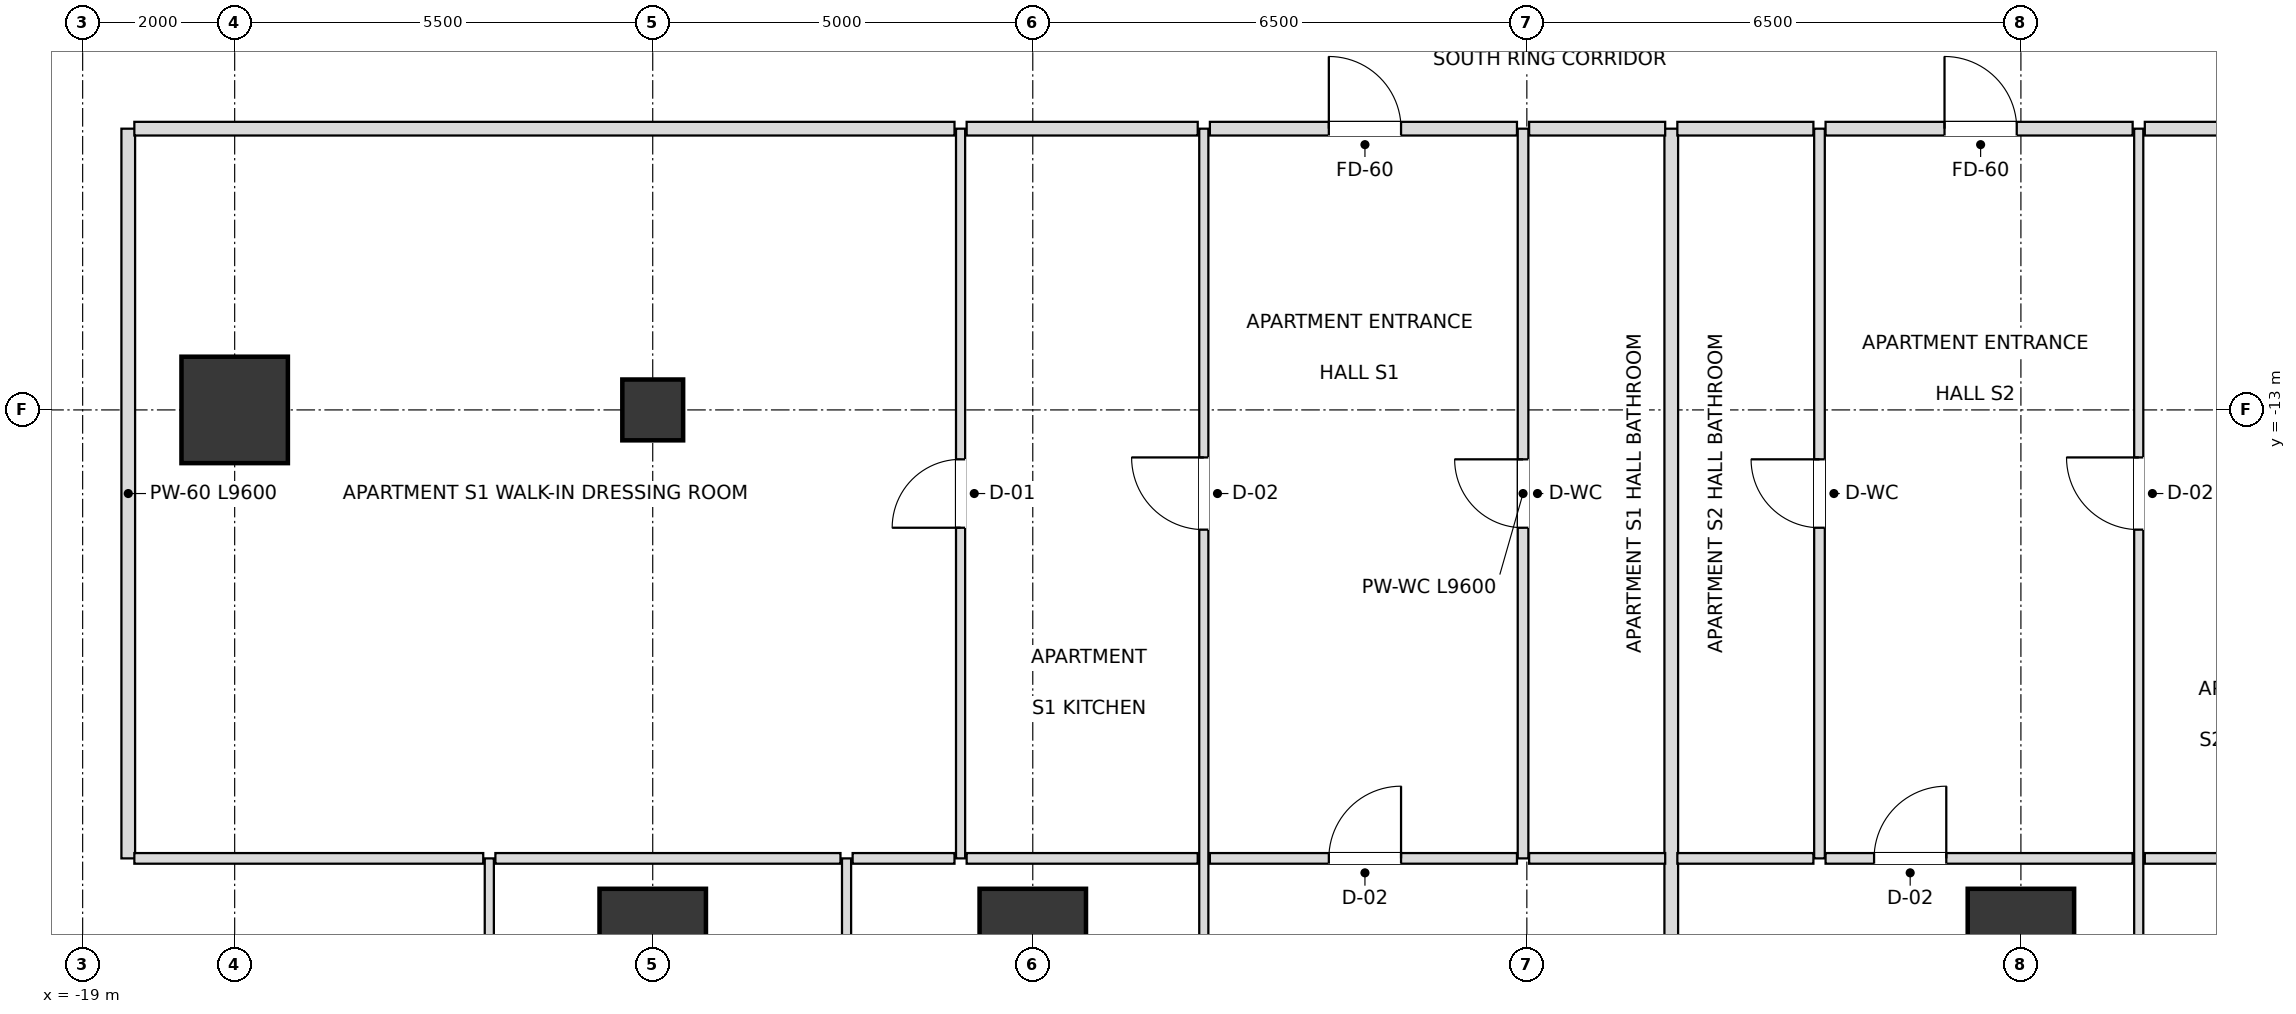
"""IFC4 building model, lengths in metres.
Left out: names, types, materials, properties, quantities, classifications, styles, units other than length and angle.
Written with IfcOpenShell. Run it as: python <this file> out.ifc"""

import sys

from ifc_helpers import new_model, si_unit, direction, frame, frame_2d, origin, origin_2d, place, context, subcontext, project, spatial, rectangle, extrude, element, fill, save


model = new_model("IFC4")
c1 = context("Model", 3, precision=1e-05, world=origin(), true_north=direction((0.0, 1.0)))
c2 = subcontext(c1, "Body", "Model", "MODEL_VIEW")
j1 = project(units=[si_unit("LENGTHUNIT", "METRE"), si_unit("PLANEANGLEUNIT", "RADIAN")], contexts=[c1])
p1 = place(None, origin())
s1 = spatial("IfcSite", under=j1, at=p1, CompositionType="ELEMENT")
p2 = place(p1, origin())
s2 = spatial("IfcBuilding", under=s1, at=p2, CompositionType="ELEMENT")
p3 = place(p2, frame((0.0, 0.0, 50.4)))
s3 = spatial("IfcBuildingStorey", under=s2, at=p3, CompositionType="ELEMENT", Elevation=50.4)
for number, where, z_axis, x_axis in (
    (1, (-11.5, -20.0, 0.0), (0.0, 0.0, 1.0), (1.0, 0.0, 0.0)),
    (2, (-6.5, -20.0, 0.0), (0.0, 0.0, 1.0), (1.0, 0.0, 0.0)),
    (3, (6.5, -20.0, 0.0), (0.0, 0.0, 1.0), (1.0, 0.0, 0.0)),
    (4, (-17.0, -13.0, 0.0), (0.0, 0.0, 1.0), (1.0, 0.0, 0.0)),
):
    element("IfcColumn", number, at=place(p3, frame(where, z_axis=z_axis, x_axis=x_axis)), inside=s3, PredefinedType="USERDEFINED", context=c2, shape_type="SweptSolid", body=[
        extrude(rectangle(XDim=1.4, YDim=1.4, at=origin_2d()), origin(), (0.0, 0.0, 1.0), 3.6),
    ])
p4 = place(p3, frame((-11.5, -13.0, 0.0), z_axis=(0.0, 0.0, 1.0), x_axis=(1.0, 0.0, 0.0)))
e5 = element("IfcColumn", 5, at=p4, inside=s3, PredefinedType="COLUMN", context=c2, shape_type="SweptSolid", body=[
    extrude(rectangle(XDim=0.8, YDim=0.8, at=origin_2d()), origin(), (0.0, 0.0, 1.0), 3.6),
])
p5 = place(p3, frame((-18.4, -18.9, 0.0), z_axis=(0.0, 0.0, 1.0), x_axis=(0.0, 1.0, 0.0)))
e6 = element("IfcWall", 6, at=p5, inside=s3, PredefinedType="PARTITIONING", context=c2, shape_type="SweptSolid", body=[
    extrude(rectangle(XDim=9.6, YDim=0.18, at=frame_2d((4.8, 0.0))), origin(), (0.0, 0.0, 1.0), 2.736),
])
p6 = place(p3, frame((-13.65, -24.9, 0.0), z_axis=(0.0, 0.0, 1.0), x_axis=(0.0, 1.0, 0.0)))
e7 = element("IfcWall", 7, at=p6, inside=s3, PredefinedType="PARTITIONING", context=c2, shape_type="SweptSolid", body=[
    extrude(rectangle(XDim=6.0, YDim=0.12, at=frame_2d((3.0, 0.0))), origin(), (0.0, 0.0, 1.0), 2.736),
])
p7 = place(p6, frame((2.55, 0.0, 0.0)))
e8 = element("IfcOpeningElement", 8, at=p7, cuts=e7, PredefinedType="OPENING", context=c2, shape_type="SweptSolid", body=[
    extrude(rectangle(XDim=0.9, YDim=2.1, at=frame_2d((0.45, 1.05))), frame((0.0, 0.07, 0.0), z_axis=(0.0, -1.0, 0.0), x_axis=(1.0, 0.0, 0.0)), (0.0, 0.0, 1.0), 0.14),
])
p8 = place(p3, frame((-8.95, -24.9, 0.0), z_axis=(0.0, 0.0, 1.0), x_axis=(0.0, 1.0, 0.0)))
e9 = element("IfcWall", 9, at=p8, inside=s3, PredefinedType="PARTITIONING", context=c2, shape_type="SweptSolid", body=[
    extrude(rectangle(XDim=6.0, YDim=0.12, at=frame_2d((3.0, 0.0))), origin(), (0.0, 0.0, 1.0), 2.816),
])
p9 = place(p8, frame((2.55, 0.0, 0.0)))
e10 = element("IfcOpeningElement", 10, at=p9, cuts=e9, PredefinedType="OPENING", context=c2, shape_type="SweptSolid", body=[
    extrude(rectangle(XDim=0.9, YDim=2.1, at=frame_2d((0.45, 1.05))), frame((0.0, 0.07, 0.0), z_axis=(0.0, -1.0, 0.0), x_axis=(1.0, 0.0, 0.0)), (0.0, 0.0, 1.0), 0.14),
])
p10 = place(p3, frame((-7.45, -18.9, 0.0), z_axis=(0.0, 0.0, 1.0), x_axis=(0.0, 1.0, 0.0)))
e11 = element("IfcWall", 11, at=p10, inside=s3, PredefinedType="PARTITIONING", context=c2, shape_type="SweptSolid", body=[
    extrude(rectangle(XDim=9.6, YDim=0.12, at=frame_2d((4.8, 0.0))), origin(), (0.0, 0.0, 1.0), 2.816),
])
p11 = place(p10, frame((4.35, 0.0, 0.0)))
e12 = element("IfcOpeningElement", 12, at=p11, cuts=e11, PredefinedType="OPENING", context=c2, shape_type="SweptSolid", body=[
    extrude(rectangle(XDim=0.9, YDim=2.1, at=frame_2d((0.45, 1.05))), frame((0.0, 0.07, 0.0), z_axis=(0.0, -1.0, 0.0), x_axis=(1.0, 0.0, 0.0)), (0.0, 0.0, 1.0), 0.14),
])
p12 = place(p3, frame((-4.25, -24.9, 0.0), z_axis=(0.0, 0.0, 1.0), x_axis=(0.0, 1.0, 0.0)))
e13 = element("IfcWall", 13, at=p12, inside=s3, PredefinedType="PARTITIONING", context=c2, shape_type="SweptSolid", body=[
    extrude(rectangle(XDim=15.6, YDim=0.12, at=frame_2d((7.8, 0.0))), origin(), (0.0, 0.0, 1.0), 2.816),
])
p13 = place(p12, frame((10.325, 0.0, 0.0)))
e14 = element("IfcOpeningElement", 14, at=p13, cuts=e13, PredefinedType="OPENING", context=c2, shape_type="SweptSolid", body=[
    extrude(rectangle(XDim=0.95, YDim=2.1, at=frame_2d((0.475, 1.05))), frame((0.0, 0.07, 0.0), z_axis=(0.0, -1.0, 0.0), x_axis=(1.0, 0.0, 0.0)), (0.0, 0.0, 1.0), 0.14),
])
p14 = place(p12, frame((2.55, 0.0, 0.0)))
e15 = element("IfcOpeningElement", 15, at=p14, cuts=e13, PredefinedType="OPENING", context=c2, shape_type="SweptSolid", body=[
    extrude(rectangle(XDim=0.9, YDim=2.1, at=frame_2d((0.45, 1.05))), frame((0.0, 0.07, 0.0), z_axis=(0.0, -1.0, 0.0), x_axis=(1.0, 0.0, 0.0)), (0.0, 0.0, 1.0), 0.14),
])
p15 = place(p3, frame((-0.05, -18.9, 0.0), z_axis=(0.0, 0.0, 1.0), x_axis=(0.0, 1.0, 0.0)))
e16 = element("IfcWall", 16, at=p15, inside=s3, PredefinedType="PARTITIONING", context=c2, shape_type="SweptSolid", body=[
    extrude(rectangle(XDim=9.6, YDim=0.14, at=frame_2d((4.8, 0.0))), origin(), (0.0, 0.0, 1.0), 2.948),
])
p16 = place(p15, frame((4.35, 0.0, 0.0)))
e17 = element("IfcOpeningElement", 17, at=p16, cuts=e16, PredefinedType="OPENING", context=c2, shape_type="SweptSolid", body=[
    extrude(rectangle(XDim=0.9, YDim=2.1, at=frame_2d((0.45, 1.05))), frame((0.0, 0.08, 0.0), z_axis=(0.0, -1.0, 0.0), x_axis=(1.0, 0.0, 0.0)), (0.0, 0.0, 1.0), 0.16),
])
p17 = place(p3, frame((1.9, -24.9, 0.0), z_axis=(0.0, 0.0, 1.0), x_axis=(0.0, 1.0, 0.0)))
e18 = element("IfcWall", 18, at=p17, inside=s3, PredefinedType="PARTITIONING", context=c2, shape_type="SweptSolid", body=[
    extrude(rectangle(XDim=15.6, YDim=0.18, at=frame_2d((7.8, 0.0))), origin(), (0.0, 0.0, 1.0), 2.816),
])
p18 = place(p3, frame((3.85, -18.9, 0.0), z_axis=(0.0, 0.0, 1.0), x_axis=(0.0, 1.0, 0.0)))
e19 = element("IfcWall", 19, at=p18, inside=s3, PredefinedType="PARTITIONING", context=c2, shape_type="SweptSolid", body=[
    extrude(rectangle(XDim=9.6, YDim=0.14, at=frame_2d((4.8, 0.0))), origin(), (0.0, 0.0, 1.0), 2.948),
])
p19 = place(p18, frame((4.35, 0.0, 0.0)))
e20 = element("IfcOpeningElement", 20, at=p19, cuts=e19, PredefinedType="OPENING", context=c2, shape_type="SweptSolid", body=[
    extrude(rectangle(XDim=0.9, YDim=2.1, at=frame_2d((0.45, 1.05))), frame((0.0, 0.08, 0.0), z_axis=(0.0, -1.0, 0.0), x_axis=(1.0, 0.0, 0.0)), (0.0, 0.0, 1.0), 0.16),
])
p20 = place(p3, frame((8.05, -24.9, 0.0), z_axis=(0.0, 0.0, 1.0), x_axis=(0.0, 1.0, 0.0)))
e21 = element("IfcWall", 21, at=p20, inside=s3, PredefinedType="PARTITIONING", context=c2, shape_type="SweptSolid", body=[
    extrude(rectangle(XDim=15.6, YDim=0.12, at=frame_2d((7.8, 0.0))), origin(), (0.0, 0.0, 1.0), 2.816),
])
p21 = place(p20, frame((10.325, 0.0, 0.0)))
e22 = element("IfcOpeningElement", 22, at=p21, cuts=e21, PredefinedType="OPENING", context=c2, shape_type="SweptSolid", body=[
    extrude(rectangle(XDim=0.95, YDim=2.1, at=frame_2d((0.475, 1.05))), frame((0.0, 0.07, 0.0), z_axis=(0.0, -1.0, 0.0), x_axis=(1.0, 0.0, 0.0)), (0.0, 0.0, 1.0), 0.14),
])
p22 = place(p20, frame((2.55, 0.0, 0.0)))
e23 = element("IfcOpeningElement", 23, at=p22, cuts=e21, PredefinedType="OPENING", context=c2, shape_type="SweptSolid", body=[
    extrude(rectangle(XDim=0.9, YDim=2.1, at=frame_2d((0.45, 1.05))), frame((0.0, 0.07, 0.0), z_axis=(0.0, -1.0, 0.0), x_axis=(1.0, 0.0, 0.0)), (0.0, 0.0, 1.0), 0.14),
])
p23 = place(p3, frame((-18.32, -18.9, 0.0), z_axis=(0.0, 0.0, 1.0), x_axis=(1.0, 0.0, 0.0)))
e24 = element("IfcWall", 24, at=p23, inside=s3, PredefinedType="PARTITIONING", context=c2, shape_type="SweptSolid", body=[
    extrude(rectangle(XDim=4.59, YDim=0.14, at=frame_2d((2.295, 0.0))), origin(), (0.0, 0.0, 1.0), 2.736),
])
p24 = place(p3, frame((-13.57, -18.9, 0.0), z_axis=(0.0, 0.0, 1.0), x_axis=(1.0, 0.0, 0.0)))
e25 = element("IfcWall", 25, at=p24, inside=s3, PredefinedType="PARTITIONING", context=c2, shape_type="SweptSolid", body=[
    extrude(rectangle(XDim=4.54, YDim=0.14, at=frame_2d((2.27, 0.0))), origin(), (0.0, 0.0, 1.0), 2.736),
])
p25 = place(p3, frame((-8.87, -18.9, 0.0), z_axis=(0.0, 0.0, 1.0), x_axis=(1.0, 0.0, 0.0)))
e26 = element("IfcWall", 26, at=p25, inside=s3, PredefinedType="PARTITIONING", context=c2, shape_type="SweptSolid", body=[
    extrude(rectangle(XDim=1.34, YDim=0.14, at=frame_2d((0.67, 0.0))), origin(), (0.0, 0.0, 1.0), 3.38),
])
p26 = place(p3, frame((-7.37, -18.9, 0.0), z_axis=(0.0, 0.0, 1.0), x_axis=(1.0, 0.0, 0.0)))
e27 = element("IfcWall", 27, at=p26, inside=s3, PredefinedType="PARTITIONING", context=c2, shape_type="SweptSolid", body=[
    extrude(rectangle(XDim=3.04, YDim=0.14, at=frame_2d((1.52, 0.0))), origin(), (0.0, 0.0, 1.0), 2.816),
])
p27 = place(p3, frame((-4.17, -18.9, 0.0), z_axis=(0.0, 0.0, 1.0), x_axis=(1.0, 0.0, 0.0)))
e28 = element("IfcWall", 28, at=p27, inside=s3, PredefinedType="PARTITIONING", context=c2, shape_type="SweptSolid", body=[
    extrude(rectangle(XDim=4.04, YDim=0.14, at=frame_2d((2.02, 0.0))), origin(), (0.0, 0.0, 1.0), 3.38),
])
p28 = place(p27, frame((1.565, 0.0, 0.0)))
e29 = element("IfcOpeningElement", 29, at=p28, cuts=e28, PredefinedType="OPENING", context=c2, shape_type="SweptSolid", body=[
    extrude(rectangle(XDim=0.95, YDim=2.1, at=frame_2d((0.475, 1.05))), frame((0.0, 0.08, 0.0), z_axis=(0.0, -1.0, 0.0), x_axis=(1.0, 0.0, 0.0)), (0.0, 0.0, 1.0), 0.16),
])
for number, where, z_axis, x_axis in (
    (30, (0.03, -18.9, 0.0), (0.0, 0.0, 1.0), (1.0, 0.0, 0.0)),
    (31, (1.98, -18.9, 0.0), (0.0, 0.0, 1.0), (1.0, 0.0, 0.0)),
):
    element("IfcWall", number, at=place(p3, frame(where, z_axis=z_axis, x_axis=x_axis)), inside=s3, PredefinedType="PARTITIONING", context=c2, shape_type="SweptSolid", body=[
        extrude(rectangle(XDim=1.79, YDim=0.14, at=frame_2d((0.895, 0.0))), origin(), (0.0, 0.0, 1.0), 3.38),
    ])
p29 = place(p3, frame((3.93, -18.9, 0.0), z_axis=(0.0, 0.0, 1.0), x_axis=(1.0, 0.0, 0.0)))
e32 = element("IfcWall", 32, at=p29, inside=s3, PredefinedType="PARTITIONING", context=c2, shape_type="SweptSolid", body=[
    extrude(rectangle(XDim=4.04, YDim=0.14, at=frame_2d((2.02, 0.0))), origin(), (0.0, 0.0, 1.0), 2.816),
])
p30 = place(p29, frame((0.638, 0.0, 0.0)))
e33 = element("IfcOpeningElement", 33, at=p30, cuts=e32, PredefinedType="OPENING", context=c2, shape_type="SweptSolid", body=[
    extrude(rectangle(XDim=0.95, YDim=2.1, at=frame_2d((0.475, 1.05))), frame((0.0, 0.08, 0.0), z_axis=(0.0, -1.0, 0.0), x_axis=(1.0, 0.0, 0.0)), (0.0, 0.0, 1.0), 0.16),
])
p31 = place(p3, frame((8.13, -18.9, 0.0), z_axis=(0.0, 0.0, 1.0), x_axis=(1.0, 0.0, 0.0)))
e34 = element("IfcWall", 34, at=p31, inside=s3, PredefinedType="PARTITIONING", context=c2, shape_type="SweptSolid", body=[
    extrude(rectangle(XDim=3.04, YDim=0.14, at=frame_2d((1.52, 0.0))), origin(), (0.0, 0.0, 1.0), 3.38),
])
p32 = place(p3, frame((-18.32, -9.3, 0.0), z_axis=(0.0, 0.0, 1.0), x_axis=(1.0, 0.0, 0.0)))
e35 = element("IfcWall", 35, at=p32, inside=s3, PredefinedType="PARTITIONING", context=c2, shape_type="SweptSolid", body=[
    extrude(rectangle(XDim=10.79, YDim=0.18, at=frame_2d((5.395, 0.0))), origin(), (0.0, 0.0, 1.0), 2.816),
])
p33 = place(p3, frame((-7.37, -9.3, 0.0), z_axis=(0.0, 0.0, 1.0), x_axis=(1.0, 0.0, 0.0)))
e36 = element("IfcWall", 36, at=p33, inside=s3, PredefinedType="PARTITIONING", context=c2, shape_type="SweptSolid", body=[
    extrude(rectangle(XDim=3.04, YDim=0.18, at=frame_2d((1.52, 0.0))), origin(), (0.0, 0.0, 1.0), 2.816),
])
p34 = place(p3, frame((-4.17, -9.3, 0.0), z_axis=(0.0, 0.0, 1.0), x_axis=(1.0, 0.0, 0.0)))
e37 = element("IfcWall", 37, at=p34, inside=s3, PredefinedType="PARTITIONING", context=c2, shape_type="SweptSolid", body=[
    extrude(rectangle(XDim=4.04, YDim=0.18, at=frame_2d((2.02, 0.0))), origin(), (0.0, 0.0, 1.0), 3.38),
])
p35 = place(p34, frame((1.565, 0.0, 0.0)))
e38 = element("IfcOpeningElement", 38, at=p35, cuts=e37, PredefinedType="OPENING", context=c2, shape_type="SweptSolid", body=[
    extrude(rectangle(XDim=0.95, YDim=2.15, at=frame_2d((0.475, 1.075))), frame((0.0, 0.1, 0.0), z_axis=(0.0, -1.0, 0.0), x_axis=(1.0, 0.0, 0.0)), (0.0, 0.0, 1.0), 0.2),
])
for number, where, z_axis, x_axis in (
    (39, (0.03, -9.3, 0.0), (0.0, 0.0, 1.0), (1.0, 0.0, 0.0)),
    (40, (1.98, -9.3, 0.0), (0.0, 0.0, 1.0), (1.0, 0.0, 0.0)),
):
    element("IfcWall", number, at=place(p3, frame(where, z_axis=z_axis, x_axis=x_axis)), inside=s3, PredefinedType="PARTITIONING", context=c2, shape_type="SweptSolid", body=[
        extrude(rectangle(XDim=1.79, YDim=0.18, at=frame_2d((0.895, 0.0))), origin(), (0.0, 0.0, 1.0), 3.38),
    ])
p36 = place(p3, frame((3.93, -9.3, 0.0), z_axis=(0.0, 0.0, 1.0), x_axis=(1.0, 0.0, 0.0)))
e41 = element("IfcWall", 41, at=p36, inside=s3, PredefinedType="PARTITIONING", context=c2, shape_type="SweptSolid", body=[
    extrude(rectangle(XDim=4.04, YDim=0.18, at=frame_2d((2.02, 0.0))), origin(), (0.0, 0.0, 1.0), 2.816),
])
p37 = place(p36, frame((1.565, 0.0, 0.0)))
e42 = element("IfcOpeningElement", 42, at=p37, cuts=e41, PredefinedType="OPENING", context=c2, shape_type="SweptSolid", body=[
    extrude(rectangle(XDim=0.95, YDim=2.15, at=frame_2d((0.475, 1.075))), frame((0.0, 0.1, 0.0), z_axis=(0.0, -1.0, 0.0), x_axis=(1.0, 0.0, 0.0)), (0.0, 0.0, 1.0), 0.2),
])
p38 = place(p3, frame((8.13, -9.3, 0.0), z_axis=(0.0, 0.0, 1.0), x_axis=(1.0, 0.0, 0.0)))
e43 = element("IfcWall", 43, at=p38, inside=s3, PredefinedType="PARTITIONING", context=c2, shape_type="SweptSolid", body=[
    extrude(rectangle(XDim=3.04, YDim=0.18, at=frame_2d((1.52, 0.0))), origin(), (0.0, 0.0, 1.0), 3.38),
])
p39 = place(p16, origin())
e44 = element("IfcDoor", 44, at=p39, inside=s3, OperationType="SINGLE_SWING_RIGHT", PredefinedType="DOOR", context=c2, shape_type="SweptSolid", body=[
    extrude(rectangle(XDim=0.9, YDim=2.1, at=frame_2d((0.45, 1.05))), frame((0.0, 0.025, 0.0), z_axis=(0.0, -1.0, 0.0), x_axis=(1.0, 0.0, 0.0)), (0.0, 0.0, 1.0), 0.05),
])
fill(e17, e44)
p40 = place(p35, origin())
e45 = element("IfcDoor", 45, at=p40, inside=s3, OperationType="SINGLE_SWING_LEFT", PredefinedType="DOOR", context=c2, shape_type="SweptSolid", body=[
    extrude(rectangle(XDim=0.95, YDim=2.15, at=frame_2d((0.475, 1.075))), frame((0.0, 0.025, 0.0), z_axis=(0.0, -1.0, 0.0), x_axis=(1.0, 0.0, 0.0)), (0.0, 0.0, 1.0), 0.05),
])
fill(e38, e45)
p41 = place(p13, origin())
e46 = element("IfcDoor", 46, at=p41, inside=s3, OperationType="SINGLE_SWING_RIGHT", PredefinedType="DOOR", context=c2, shape_type="SweptSolid", body=[
    extrude(rectangle(XDim=0.95, YDim=2.1, at=frame_2d((0.475, 1.05))), frame((0.0, 0.025, 0.0), z_axis=(0.0, -1.0, 0.0), x_axis=(1.0, 0.0, 0.0)), (0.0, 0.0, 1.0), 0.05),
])
fill(e14, e46)
p42 = place(p11, origin())
e47 = element("IfcDoor", 47, at=p42, inside=s3, OperationType="SINGLE_SWING_LEFT", PredefinedType="DOOR", context=c2, shape_type="SweptSolid", body=[
    extrude(rectangle(XDim=0.9, YDim=2.1, at=frame_2d((0.45, 1.05))), frame((0.0, 0.025, 0.0), z_axis=(0.0, -1.0, 0.0), x_axis=(1.0, 0.0, 0.0)), (0.0, 0.0, 1.0), 0.05),
])
fill(e12, e47)
p43 = place(p28, origin())
e48 = element("IfcDoor", 48, at=p43, inside=s3, OperationType="SINGLE_SWING_RIGHT", PredefinedType="DOOR", context=c2, shape_type="SweptSolid", body=[
    extrude(rectangle(XDim=0.95, YDim=2.1, at=frame_2d((0.475, 1.05))), frame((0.0, 0.025, 0.0), z_axis=(0.0, -1.0, 0.0), x_axis=(1.0, 0.0, 0.0)), (0.0, 0.0, 1.0), 0.05),
])
fill(e29, e48)
p44 = place(p19, origin())
e49 = element("IfcDoor", 49, at=p44, inside=s3, OperationType="SINGLE_SWING_RIGHT", PredefinedType="DOOR", context=c2, shape_type="SweptSolid", body=[
    extrude(rectangle(XDim=0.9, YDim=2.1, at=frame_2d((0.45, 1.05))), frame((0.0, 0.025, 0.0), z_axis=(0.0, -1.0, 0.0), x_axis=(1.0, 0.0, 0.0)), (0.0, 0.0, 1.0), 0.05),
])
fill(e20, e49)
p45 = place(p37, origin())
e50 = element("IfcDoor", 50, at=p45, inside=s3, OperationType="SINGLE_SWING_LEFT", PredefinedType="DOOR", context=c2, shape_type="SweptSolid", body=[
    extrude(rectangle(XDim=0.95, YDim=2.15, at=frame_2d((0.475, 1.075))), frame((0.0, 0.025, 0.0), z_axis=(0.0, -1.0, 0.0), x_axis=(1.0, 0.0, 0.0)), (0.0, 0.0, 1.0), 0.05),
])
fill(e42, e50)
p46 = place(p21, origin())
e51 = element("IfcDoor", 51, at=p46, inside=s3, OperationType="SINGLE_SWING_RIGHT", PredefinedType="DOOR", context=c2, shape_type="SweptSolid", body=[
    extrude(rectangle(XDim=0.95, YDim=2.1, at=frame_2d((0.475, 1.05))), frame((0.0, 0.025, 0.0), z_axis=(0.0, -1.0, 0.0), x_axis=(1.0, 0.0, 0.0)), (0.0, 0.0, 1.0), 0.05),
])
fill(e22, e51)
p47 = place(p30, origin())
e52 = element("IfcDoor", 52, at=p47, inside=s3, OperationType="SINGLE_SWING_RIGHT", PredefinedType="DOOR", context=c2, shape_type="SweptSolid", body=[
    extrude(rectangle(XDim=0.95, YDim=2.1, at=frame_2d((0.475, 1.05))), frame((0.0, 0.025, 0.0), z_axis=(0.0, -1.0, 0.0), x_axis=(1.0, 0.0, 0.0)), (0.0, 0.0, 1.0), 0.05),
])
fill(e33, e52)
save(model, sys.argv[1])
